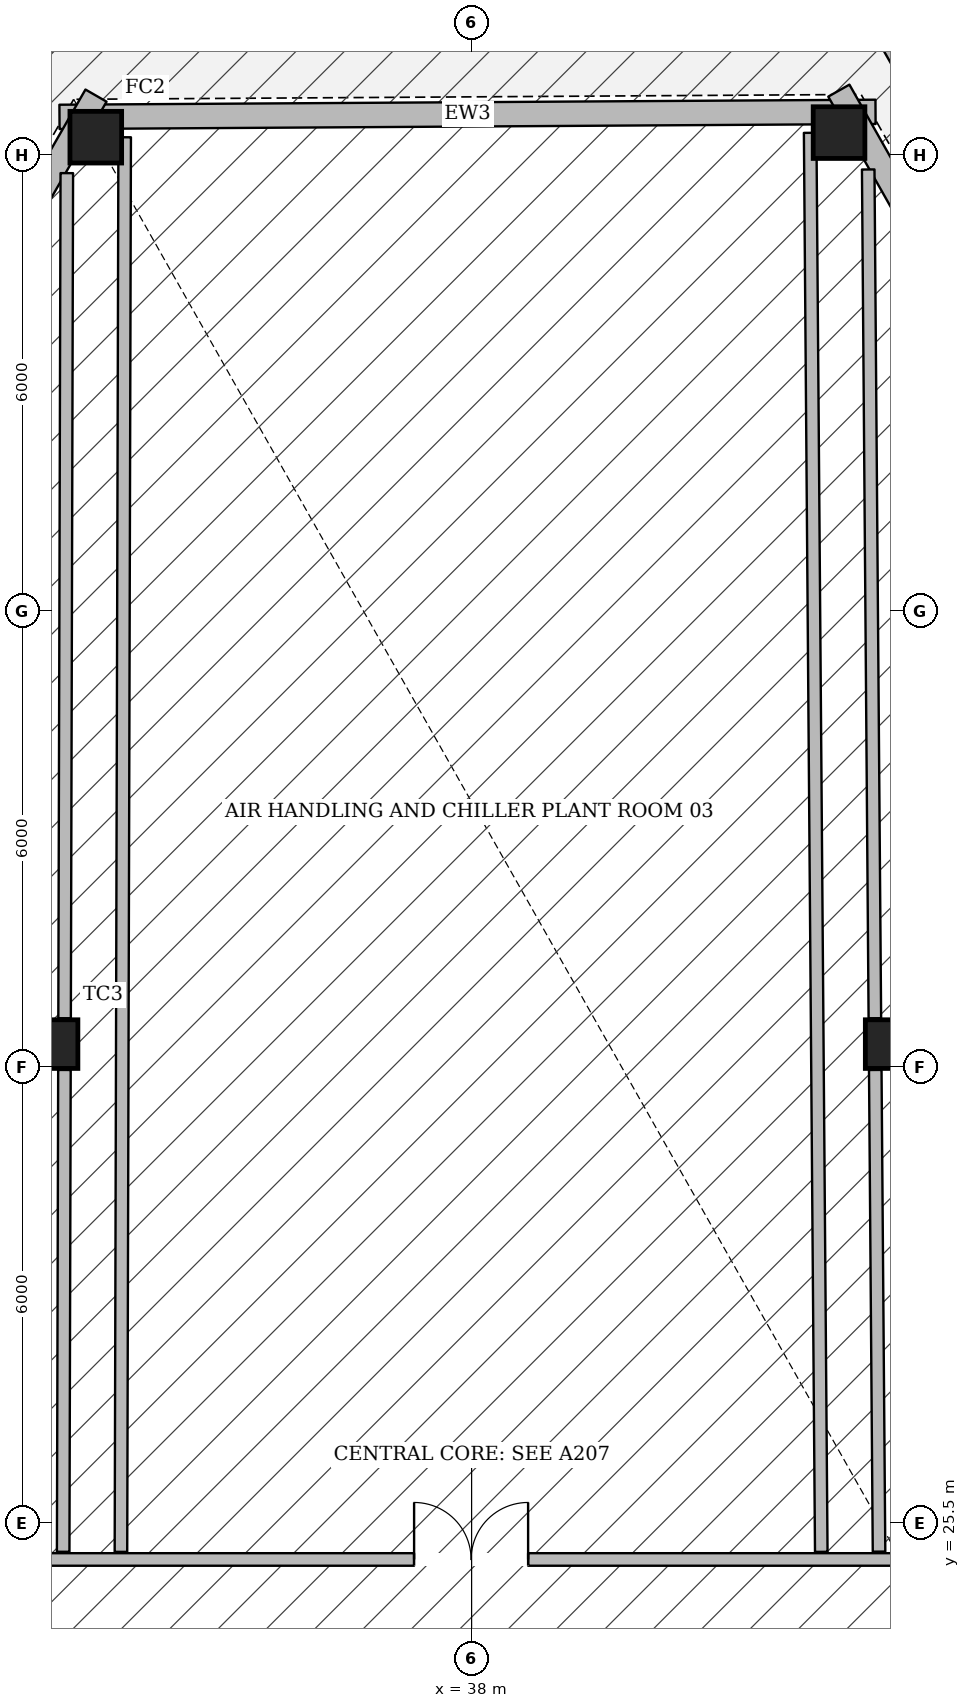
"""IFC4 building model, lengths in metres.
Left out: names, types, materials, properties, quantities, classifications, styles, units other than length and angle.
Written with IfcOpenShell. Run it as: python <this file> out.ifc"""

import sys

from ifc_helpers import new_model, si_unit, direction, frame, frame_2d, origin, origin_2d, place, context, subcontext, project, spatial, rectangle, hollow_rectangle, extrude, element, fill, save


model = new_model("IFC4")
c1 = context("Model", 3, precision=1e-05, world=origin(), true_north=direction((0.0, 1.0)))
c2 = subcontext(c1, "Body", "Model", "MODEL_VIEW")
j1 = project(units=[si_unit("LENGTHUNIT", "METRE"), si_unit("PLANEANGLEUNIT", "RADIAN")], contexts=[c1])
p1 = place(None, origin())
s1 = spatial("IfcSite", under=j1, at=p1, CompositionType="ELEMENT")
p2 = place(p1, origin())
s2 = spatial("IfcBuilding", under=s1, at=p2, CompositionType="ELEMENT")
p3 = place(p2, frame((0.0, 0.0, 154.8)))
s3 = spatial("IfcBuildingStorey", under=s2, at=p3, CompositionType="ELEMENT", Elevation=154.8)
for number, where, z_axis, x_axis in (
    (1, (33.056, 43.731, 0.0), (0.0, 0.0, 1.0), (1.0, 0.0, 0.0)),
    (2, (42.834, 43.792, 0.0), (0.0, 0.0, 1.0), (1.0, 0.0, 0.0)),
):
    element("IfcColumn", number, at=place(p3, frame(where, z_axis=z_axis, x_axis=x_axis)), inside=s3, PredefinedType="COLUMN", context=c2, shape_type="SweptSolid", body=[
        extrude(hollow_rectangle(XDim=0.68, YDim=0.68, WallThickness=0.03, at=origin_2d()), origin(), (0.0, 0.0, 1.0), 4.985),
    ])
for number, where, z_axis, x_axis in (
    (3, (32.5, 31.8, 0.0), (0.0, 0.0, 1.0), (1.0, 0.0, 0.0)),
    (4, (43.5, 31.8, 0.0), (0.0, 0.0, 1.0), (1.0, 0.0, 0.0)),
):
    element("IfcColumn", number, at=place(p3, frame(where, z_axis=z_axis, x_axis=x_axis)), inside=s3, PredefinedType="COLUMN", context=c2, shape_type="SweptSolid", body=[
        extrude(hollow_rectangle(XDim=0.64, YDim=0.64, WallThickness=0.028, at=origin_2d()), origin(), (0.0, 0.0, 1.0), 4.985),
    ])
p4 = place(p3, frame((32.578, 43.999, 0.0), z_axis=(0.0, 0.0, 1.0), x_axis=(0.999981011768, 0.006162475365, 0.0)))
e5 = element("IfcWall", 5, at=p4, inside=s3, PredefinedType="STANDARD", context=c2, shape_type="SweptSolid", body=[
    extrude(rectangle(XDim=10.736, YDim=0.32, at=frame_2d((5.368, 0.0))), origin(), (0.0, 0.0, 1.0), 3.677),
])
p5 = place(p3, frame((14.686, 12.292, 0.0), z_axis=(0.0, 0.0, 1.0), x_axis=(0.498068556708, 0.867137655057, 0.0)))
e6 = element("IfcWall", 6, at=p5, inside=s3, PredefinedType="STANDARD", context=c2, shape_type="SweptSolid", body=[
    extrude(rectangle(XDim=36.888, YDim=0.32, at=frame_2d((18.444, 0.0))), origin(), (0.0, 0.0, 1.0), 3.677),
])
p6 = place(p3, frame((42.832, 44.344, 0.0), z_axis=(0.0, 0.0, 1.0), x_axis=(0.492716907926, -0.870189662455, 0.0)))
e7 = element("IfcWall", 7, at=p6, inside=s3, PredefinedType="STANDARD", context=c2, shape_type="SweptSolid", body=[
    extrude(rectangle(XDim=36.505, YDim=0.32, at=frame_2d((18.253, 0.0))), origin(), (0.0, 0.0, 1.0), 3.677),
])
p7 = place(p3, frame((32.566, 45.26, 0.0), z_axis=(0.0, 0.0, 1.0), x_axis=(-0.50091530354, -0.865496307721, 0.0)))
e8 = element("IfcWall", 8, at=p7, inside=s3, PredefinedType="PARAPET", context=c2, shape_type="SweptSolid", body=[
    extrude(rectangle(XDim=38.428, YDim=0.24, at=frame_2d((19.214, 0.0))), origin(), (0.0, 0.0, 1.0), 1.25),
])
p8 = place(p3, frame((62.043, 12.37, 0.0), z_axis=(0.0, 0.0, 1.0), x_axis=(-0.494365638539, 0.869254056897, 0.0)))
e9 = element("IfcWall", 9, at=p8, inside=s3, PredefinedType="PARAPET", context=c2, shape_type="SweptSolid", body=[
    extrude(rectangle(XDim=37.934, YDim=0.24, at=frame_2d((18.967, 0.0))), origin(), (0.0, 0.0, 1.0), 1.25),
])
p9 = place(p3, frame((26.06, 25.02, 0.0), z_axis=(0.0, 0.0, 1.0), x_axis=(1.0, 0.0, 0.0)))
e10 = element("IfcWall", 10, at=p9, inside=s3, PredefinedType="PARTITIONING", context=c2, shape_type="SweptSolid", body=[
    extrude(rectangle(XDim=23.88, YDim=0.165, at=frame_2d((11.94, 0.0))), origin(), (0.0, 0.0, 1.0), 4.985),
])
p10 = place(p9, frame((19.765, 0.0, 0.0)))
e11 = element("IfcOpeningElement", 11, at=p10, cuts=e10, PredefinedType="OPENING", context=c2, shape_type="SweptSolid", body=[
    extrude(rectangle(XDim=1.5, YDim=2.25, at=frame_2d((0.75, 1.125))), frame((0.0, 0.093, 0.0), z_axis=(0.0, -1.0, 0.0), x_axis=(1.0, 0.0, 0.0)), (0.0, 0.0, 1.0), 0.185),
])
p11 = place(p9, frame((11.183, 0.0, 0.0)))
e12 = element("IfcOpeningElement", 12, at=p11, cuts=e10, PredefinedType="OPENING", context=c2, shape_type="SweptSolid", body=[
    extrude(rectangle(XDim=1.5, YDim=2.25, at=frame_2d((0.75, 1.125))), frame((0.0, 0.093, 0.0), z_axis=(0.0, -1.0, 0.0), x_axis=(1.0, 0.0, 0.0)), (0.0, 0.0, 1.0), 0.185),
])
p12 = place(p3, frame((32.627, 25.121, 0.0), z_axis=(0.0, 0.0, 1.0), x_axis=(0.002619001956, 0.999996570408, 0.0)))
e13 = element("IfcWall", 13, at=p12, inside=s3, PredefinedType="PARTITIONING", context=c2, shape_type="SweptSolid", body=[
    extrude(rectangle(XDim=6.339, YDim=0.165, at=frame_2d((3.169, 0.0))), origin(), (0.0, 0.0, 1.0), 4.985),
])
p13 = place(p3, frame((32.645, 32.14, 0.0), z_axis=(0.0, 0.0, 1.0), x_axis=(0.002634979105, 0.999996528437, 0.0)))
e14 = element("IfcWall", 14, at=p13, inside=s3, PredefinedType="PARTITIONING", context=c2, shape_type="SweptSolid", body=[
    extrude(rectangle(XDim=11.118, YDim=0.165, at=frame_2d((5.559, 0.0))), origin(), (0.0, 0.0, 1.0), 3.68),
])
p14 = place(p3, frame((33.387, 25.12, 0.0), z_axis=(0.0, 0.0, 1.0), x_axis=(0.002636817196, 0.999996523591, 0.0)))
e15 = element("IfcWall", 15, at=p14, inside=s3, PredefinedType="PARTITIONING", context=c2, shape_type="SweptSolid", body=[
    extrude(rectangle(XDim=18.61, YDim=0.165, at=frame_2d((9.305, 0.0))), origin(), (0.0, 0.0, 1.0), 4.985),
])
p15 = place(p3, frame((42.6, 25.12, 0.0), z_axis=(0.0, 0.0, 1.0), x_axis=(-0.007833204162, 0.999969319986, 0.0)))
e16 = element("IfcWall", 16, at=p15, inside=s3, PredefinedType="PARTITIONING", context=c2, shape_type="SweptSolid", body=[
    extrude(rectangle(XDim=18.669, YDim=0.165, at=frame_2d((9.334, 0.0))), origin(), (0.0, 0.0, 1.0), 4.985),
])
p16 = place(p3, frame((43.36, 25.123, 0.0), z_axis=(0.0, 0.0, 1.0), x_axis=(-0.007820688544, 0.999969417948, 0.0)))
e17 = element("IfcWall", 17, at=p16, inside=s3, PredefinedType="PARTITIONING", context=c2, shape_type="SweptSolid", body=[
    extrude(rectangle(XDim=6.337, YDim=0.165, at=frame_2d((3.168, 0.0))), origin(), (0.0, 0.0, 1.0), 4.985),
])
p17 = place(p3, frame((43.305, 32.14, 0.0), z_axis=(0.0, 0.0, 1.0), x_axis=(-0.007848811534, 0.999969197604, 0.0)))
e18 = element("IfcWall", 18, at=p17, inside=s3, PredefinedType="PARTITIONING", context=c2, shape_type="SweptSolid", body=[
    extrude(rectangle(XDim=11.167, YDim=0.165, at=frame_2d((5.583, 0.0))), origin(), (0.0, 0.0, 1.0), 3.68),
])
p18 = place(p11, origin())
e19 = element("IfcDoor", 19, at=p18, inside=s3, OperationType="DOUBLE_DOOR_SINGLE_SWING", PredefinedType="DOOR", context=c2, shape_type="SweptSolid", body=[
    extrude(rectangle(XDim=1.5, YDim=2.25, at=frame_2d((0.75, 1.125))), frame((0.0, 0.025, 0.0), z_axis=(0.0, -1.0, 0.0), x_axis=(1.0, 0.0, 0.0)), (0.0, 0.0, 1.0), 0.05),
])
fill(e12, e19)
save(model, sys.argv[1])
